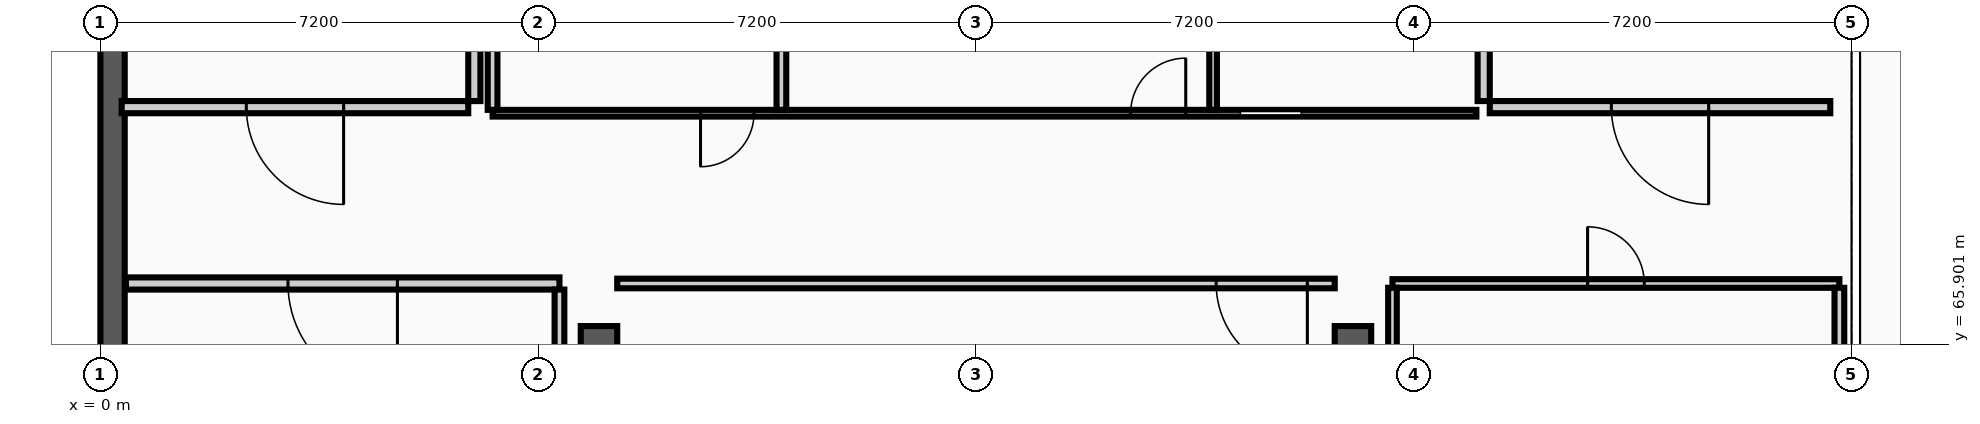
"""IFC4 building model, lengths in metres.
Left out: names, types, materials, properties, quantities, classifications, styles, units other than length and angle.
Written with IfcOpenShell. Run it as: python <this file> out.ifc"""

import sys

from ifc_helpers import new_model, si_unit, direction, frame, frame_2d, origin, place, context, subcontext, project, spatial, rectangle, extrude, element, fill, save


model = new_model("IFC4")
c1 = context("Model", 3, precision=1e-05, world=origin(), true_north=direction((0.0, 1.0)))
c2 = subcontext(c1, "Body", "Model", "MODEL_VIEW")
j1 = project(units=[si_unit("LENGTHUNIT", "METRE"), si_unit("PLANEANGLEUNIT", "RADIAN")], contexts=[c1])
p1 = place(None, origin())
s1 = spatial("IfcSite", under=j1, at=p1, CompositionType="ELEMENT")
p2 = place(p1, origin())
s2 = spatial("IfcBuilding", under=s1, at=p2, CompositionType="ELEMENT")
p3 = place(p2, frame((0.0, 0.0, -4.8)))
s3 = spatial("IfcBuildingStorey", under=s2, at=p3, CompositionType="ELEMENT", Elevation=-4.8)
p4 = place(p3, frame((0.2, 81.6, 0.0), z_axis=(0.0, 0.0, 1.0), x_axis=(0.0, -1.0, 0.0)))
e1 = element("IfcWall", 1, at=p4, inside=s3, PredefinedType="USERDEFINED", context=c2, shape_type="SweptSolid", body=[
    extrude(rectangle(XDim=81.2, YDim=0.4, at=frame_2d((40.6, 0.0))), origin(), (0.0, 0.0, 1.0), 4.545),
])
for number, where, z_axis, x_axis in (
    (2, (8.2, 58.6, 0.0), (0.0, 0.0, 1.0), (0.0, 1.0, 0.0)),
    (3, (20.6, 58.6, 0.0), (0.0, 0.0, 1.0), (0.0, 1.0, 0.0)),
):
    element("IfcWall", number, at=place(p3, frame(where, z_axis=z_axis, x_axis=x_axis)), inside=s3, PredefinedType="SHEAR", context=c2, shape_type="SweptSolid", body=[
        extrude(rectangle(XDim=7.6, YDim=0.6, at=frame_2d((3.8, 0.0))), origin(), (0.0, 0.0, 1.0), 4.5),
    ])
p5 = place(p3, frame((0.35, 69.8, 0.0), z_axis=(0.0, 0.0, 1.0), x_axis=(1.0, 0.0, 0.0)))
e4 = element("IfcWall", 4, at=p5, inside=s3, PredefinedType="PARTITIONING", context=c2, shape_type="SweptSolid", body=[
    extrude(rectangle(XDim=5.7, YDim=0.2, at=frame_2d((2.85, 0.0))), origin(), (0.0, 0.0, 1.0), 4.545),
])
p6 = place(p5, frame((2.05, 0.0, 0.0)))
e5 = element("IfcOpeningElement", 5, at=p6, cuts=e4, PredefinedType="OPENING", context=c2, shape_type="SweptSolid", body=[
    extrude(rectangle(XDim=1.6, YDim=2.2, at=frame_2d((0.8, 1.1))), frame((0.0, 0.11, 0.0), z_axis=(0.0, -1.0, 0.0), x_axis=(1.0, 0.0, 0.0)), (0.0, 0.0, 1.0), 0.22),
])
p7 = place(p3, frame((6.15, 69.9, 0.0), z_axis=(0.0, 0.0, 1.0), x_axis=(0.0, 1.0, 0.0)))
e6 = element("IfcWall", 6, at=p7, inside=s3, PredefinedType="PARTITIONING", context=c2, shape_type="SweptSolid", body=[
    extrude(rectangle(XDim=3.2, YDim=0.2, at=frame_2d((1.6, 0.0))), origin(), (0.0, 0.0, 1.0), 4.545),
])
p8 = place(p3, frame((22.85, 69.8, 0.0), z_axis=(0.0, 0.0, 1.0), x_axis=(1.0, 0.0, 0.0)))
e7 = element("IfcWall", 7, at=p8, inside=s3, PredefinedType="PARTITIONING", context=c2, shape_type="SweptSolid", body=[
    extrude(rectangle(XDim=5.6, YDim=0.2, at=frame_2d((2.8, 0.0))), origin(), (0.0, 0.0, 1.0), 4.545),
])
p9 = place(p8, frame((2.0, 0.0, 0.0)))
e8 = element("IfcOpeningElement", 8, at=p9, cuts=e7, PredefinedType="OPENING", context=c2, shape_type="SweptSolid", body=[
    extrude(rectangle(XDim=1.6, YDim=2.2, at=frame_2d((0.8, 1.1))), frame((0.0, 0.11, 0.0), z_axis=(0.0, -1.0, 0.0), x_axis=(1.0, 0.0, 0.0)), (0.0, 0.0, 1.0), 0.22),
])
p10 = place(p3, frame((22.75, 69.9, 0.0), z_axis=(0.0, 0.0, 1.0), x_axis=(0.0, 1.0, 0.0)))
e9 = element("IfcWall", 9, at=p10, inside=s3, PredefinedType="PARTITIONING", context=c2, shape_type="SweptSolid", body=[
    extrude(rectangle(XDim=3.2, YDim=0.2, at=frame_2d((1.6, 0.0))), origin(), (0.0, 0.0, 1.0), 4.545),
])
p11 = place(p3, frame((0.42, 66.9, 0.0), z_axis=(0.0, 0.0, 1.0), x_axis=(1.0, 0.0, 0.0)))
e10 = element("IfcWall", 10, at=p11, inside=s3, PredefinedType="PARTITIONING", context=c2, shape_type="SweptSolid", body=[
    extrude(rectangle(XDim=7.13, YDim=0.2, at=frame_2d((3.565, 0.0))), origin(), (0.0, 0.0, 1.0), 4.545),
])
p12 = place(p11, frame((2.665, 0.0, 0.0)))
e11 = element("IfcOpeningElement", 11, at=p12, cuts=e10, PredefinedType="OPENING", context=c2, shape_type="SweptSolid", body=[
    extrude(rectangle(XDim=1.8, YDim=2.3, at=frame_2d((0.9, 1.15))), frame((0.0, 0.11, 0.0), z_axis=(0.0, -1.0, 0.0), x_axis=(1.0, 0.0, 0.0)), (0.0, 0.0, 1.0), 0.22),
])
p13 = place(p3, frame((8.5, 66.9, 0.0), z_axis=(0.0, 0.0, 1.0), x_axis=(1.0, 0.0, 0.0)))
e12 = element("IfcWall", 12, at=p13, inside=s3, PredefinedType="PARTITIONING", context=c2, shape_type="SweptSolid", body=[
    extrude(rectangle(XDim=11.8, YDim=0.158, at=frame_2d((5.9, 0.0))), origin(), (0.0, 0.0, 1.0), 4.545),
])
p14 = place(p13, frame((9.85, 0.0, 0.0)))
e13 = element("IfcOpeningElement", 13, at=p14, cuts=e12, PredefinedType="OPENING", context=c2, shape_type="SweptSolid", body=[
    extrude(rectangle(XDim=1.5, YDim=2.2, at=frame_2d((0.75, 1.1))), frame((0.0, 0.089, 0.0), z_axis=(0.0, -1.0, 0.0), x_axis=(1.0, 0.0, 0.0)), (0.0, 0.0, 1.0), 0.178),
])
p15 = place(p3, frame((21.25, 66.9, 0.0), z_axis=(0.0, 0.0, 1.0), x_axis=(1.0, 0.0, 0.0)))
e14 = element("IfcWall", 14, at=p15, inside=s3, PredefinedType="PARTITIONING", context=c2, shape_type="SweptSolid", body=[
    extrude(rectangle(XDim=7.35, YDim=0.142, at=frame_2d((3.675, 0.0))), origin(), (0.0, 0.0, 1.0), 4.545),
])
p16 = place(p15, frame((3.209, 0.0, 0.0)))
e15 = element("IfcOpeningElement", 15, at=p16, cuts=e14, PredefinedType="OPENING", context=c2, shape_type="SweptSolid", body=[
    extrude(rectangle(XDim=0.932, YDim=2.068, at=frame_2d((0.466, 1.034))), frame((0.0, 0.081, 0.0), z_axis=(0.0, -1.0, 0.0), x_axis=(1.0, 0.0, 0.0)), (0.0, 0.0, 1.0), 0.162),
])
p17 = place(p3, frame((6.45, 69.7, 0.0), z_axis=(0.0, 0.0, 1.0), x_axis=(1.0, 0.0, 0.0)))
e16 = element("IfcWall", 16, at=p17, inside=s3, PredefinedType="PARTITIONING", context=c2, shape_type="SweptSolid", body=[
    extrude(rectangle(XDim=16.18, YDim=0.11, at=frame_2d((8.09, 0.0))), origin(), (0.0, 0.0, 1.0), 4.545),
])
p18 = place(p17, frame((12.3, 0.0, 0.0)))
e17 = element("IfcOpeningElement", 17, at=p18, cuts=e16, PredefinedType="OPENING", context=c2, shape_type="SweptSolid", body=[
    extrude(rectangle(XDim=1.0, YDim=2.1, at=frame_2d((0.5, 1.05))), frame((0.0, 0.065, 0.0), z_axis=(0.0, -1.0, 0.0), x_axis=(1.0, 0.0, 0.0)), (0.0, 0.0, 1.0), 0.13),
])
p19 = place(p17, frame((3.42, 0.0, 0.0)))
e18 = element("IfcOpeningElement", 18, at=p19, cuts=e16, PredefinedType="OPENING", context=c2, shape_type="SweptSolid", body=[
    extrude(rectangle(XDim=0.88, YDim=2.068, at=frame_2d((0.44, 1.034))), frame((0.0, 0.065, 0.0), z_axis=(0.0, -1.0, 0.0), x_axis=(1.0, 0.0, 0.0)), (0.0, 0.0, 1.0), 0.13),
])
p20 = place(p17, frame((10.494, 0.0, 0.0)))
e19 = element("IfcOpeningElement", 19, at=p20, cuts=e16, PredefinedType="OPENING", context=c2, shape_type="SweptSolid", body=[
    extrude(rectangle(XDim=0.906, YDim=2.068, at=frame_2d((0.453, 1.034))), frame((0.0, 0.065, 0.0), z_axis=(0.0, -1.0, 0.0), x_axis=(1.0, 0.0, 0.0)), (0.0, 0.0, 1.0), 0.13),
])
p21 = place(p3, frame((6.45, 69.755, 0.0), z_axis=(0.0, 0.0, 1.0), x_axis=(0.0, 1.0, 0.0)))
e20 = element("IfcWall", 20, at=p21, inside=s3, PredefinedType="PARTITIONING", context=c2, shape_type="SweptSolid", body=[
    extrude(rectangle(XDim=3.17, YDim=0.16, at=frame_2d((1.585, 0.0))), origin(), (0.0, 0.0, 1.0), 4.545),
])
p22 = place(p3, frame((7.55, 65.18, 0.0), z_axis=(0.0, 0.0, 1.0), x_axis=(0.0, 1.0, 0.0)))
e21 = element("IfcWall", 21, at=p22, inside=s3, PredefinedType="PARTITIONING", context=c2, shape_type="SweptSolid", body=[
    extrude(rectangle(XDim=1.62, YDim=0.16, at=frame_2d((0.81, 0.0))), origin(), (0.0, 0.0, 1.0), 4.545),
])
p23 = place(p3, frame((11.2, 69.755, 0.0), z_axis=(0.0, 0.0, 1.0), x_axis=(0.0, 1.0, 0.0)))
e22 = element("IfcWall", 22, at=p23, inside=s3, PredefinedType="PARTITIONING", context=c2, shape_type="SweptSolid", body=[
    extrude(rectangle(XDim=11.845, YDim=0.16, at=frame_2d((5.923, 0.0))), origin(), (0.0, 0.0, 1.0), 4.545),
])
p24 = place(p3, frame((18.3, 69.755, 0.0), z_axis=(0.0, 0.0, 1.0), x_axis=(0.0, 1.0, 0.0)))
e23 = element("IfcWall", 23, at=p24, inside=s3, PredefinedType="PARTITIONING", context=c2, shape_type="SweptSolid", body=[
    extrude(rectangle(XDim=11.845, YDim=0.125, at=frame_2d((5.923, 0.0))), origin(), (0.0, 0.0, 1.0), 4.545),
])
p25 = place(p3, frame((21.25, 65.18, 0.0), z_axis=(0.0, 0.0, 1.0), x_axis=(0.0, 1.0, 0.0)))
e24 = element("IfcWall", 24, at=p25, inside=s3, PredefinedType="PARTITIONING", context=c2, shape_type="SweptSolid", body=[
    extrude(rectangle(XDim=1.649, YDim=0.142, at=frame_2d((0.825, 0.0))), origin(), (0.0, 0.0, 1.0), 4.545),
])
p26 = place(p3, frame((28.6, 65.18, 0.0), z_axis=(0.0, 0.0, 1.0), x_axis=(0.0, 1.0, 0.0)))
e25 = element("IfcWall", 25, at=p26, inside=s3, PredefinedType="PARTITIONING", context=c2, shape_type="SweptSolid", body=[
    extrude(rectangle(XDim=1.649, YDim=0.16, at=frame_2d((0.825, 0.0))), origin(), (0.0, 0.0, 1.0), 4.235),
])
p27 = place(p6, origin())
e26 = element("IfcDoor", 26, at=p27, inside=s3, OperationType="DOUBLE_DOOR_SINGLE_SWING", PredefinedType="DOOR", context=c2, shape_type="SweptSolid", body=[
    extrude(rectangle(XDim=1.6, YDim=2.2, at=frame_2d((0.8, 1.1))), frame((0.0, 0.025, 0.0), z_axis=(0.0, -1.0, 0.0), x_axis=(1.0, 0.0, 0.0)), (0.0, 0.0, 1.0), 0.05),
])
fill(e5, e26)
p28 = place(p9, origin())
e27 = element("IfcDoor", 27, at=p28, inside=s3, OperationType="DOUBLE_DOOR_SINGLE_SWING", PredefinedType="DOOR", context=c2, shape_type="SweptSolid", body=[
    extrude(rectangle(XDim=1.6, YDim=2.2, at=frame_2d((0.8, 1.1))), frame((0.0, 0.025, 0.0), z_axis=(0.0, -1.0, 0.0), x_axis=(1.0, 0.0, 0.0)), (0.0, 0.0, 1.0), 0.05),
])
fill(e8, e27)
p29 = place(p14, origin())
e28 = element("IfcDoor", 28, at=p29, inside=s3, OperationType="DOUBLE_DOOR_SINGLE_SWING", PredefinedType="DOOR", context=c2, shape_type="SweptSolid", body=[
    extrude(rectangle(XDim=1.5, YDim=2.2, at=frame_2d((0.75, 1.1))), frame((0.0, 0.025, 0.0), z_axis=(0.0, -1.0, 0.0), x_axis=(1.0, 0.0, 0.0)), (0.0, 0.0, 1.0), 0.05),
])
fill(e13, e28)
p30 = place(p18, frame((1.0, 0.0, 0.0), z_axis=(0.0, 0.0, 1.0), x_axis=(-1.0, 0.0, 0.0)))
e29 = element("IfcDoor", 29, at=p30, inside=s3, OperationType="SLIDING_TO_LEFT", PredefinedType="DOOR", context=c2, shape_type="SweptSolid", body=[
    extrude(rectangle(XDim=1.0, YDim=2.1, at=frame_2d((0.5, 1.05))), frame((0.0, 0.025, 0.0), z_axis=(0.0, -1.0, 0.0), x_axis=(1.0, 0.0, 0.0)), (0.0, 0.0, 1.0), 0.05),
])
fill(e17, e29)
p31 = place(p19, frame((0.88, 0.0, 0.0), z_axis=(0.0, 0.0, 1.0), x_axis=(-1.0, 0.0, 0.0)))
e30 = element("IfcDoor", 30, at=p31, inside=s3, OperationType="SINGLE_SWING_LEFT", PredefinedType="DOOR", context=c2, shape_type="SweptSolid", body=[
    extrude(rectangle(XDim=0.88, YDim=2.068, at=frame_2d((0.44, 1.034))), frame((0.0, 0.025, 0.0), z_axis=(0.0, -1.0, 0.0), x_axis=(1.0, 0.0, 0.0)), (0.0, 0.0, 1.0), 0.05),
])
fill(e18, e30)
p32 = place(p20, frame((0.906, 0.0, 0.0), z_axis=(0.0, 0.0, 1.0), x_axis=(-1.0, 0.0, 0.0)))
e31 = element("IfcDoor", 31, at=p32, inside=s3, OperationType="SINGLE_SWING_RIGHT", PredefinedType="DOOR", context=c2, shape_type="SweptSolid", body=[
    extrude(rectangle(XDim=0.906, YDim=2.068, at=frame_2d((0.453, 1.034))), frame((0.0, 0.025, 0.0), z_axis=(0.0, -1.0, 0.0), x_axis=(1.0, 0.0, 0.0)), (0.0, 0.0, 1.0), 0.05),
])
fill(e19, e31)
p33 = place(p12, origin())
e32 = element("IfcDoor", 32, at=p33, inside=s3, OperationType="DOUBLE_DOOR_SINGLE_SWING", PredefinedType="DOOR", context=c2, shape_type="SweptSolid", body=[
    extrude(rectangle(XDim=1.8, YDim=2.3, at=frame_2d((0.9, 1.15))), frame((0.0, 0.025, 0.0), z_axis=(0.0, -1.0, 0.0), x_axis=(1.0, 0.0, 0.0)), (0.0, 0.0, 1.0), 0.05),
])
fill(e11, e32)
p34 = place(p16, origin())
e33 = element("IfcDoor", 33, at=p34, inside=s3, OperationType="SINGLE_SWING_LEFT", PredefinedType="DOOR", context=c2, shape_type="SweptSolid", body=[
    extrude(rectangle(XDim=0.932, YDim=2.068, at=frame_2d((0.466, 1.034))), frame((0.0, 0.025, 0.0), z_axis=(0.0, -1.0, 0.0), x_axis=(1.0, 0.0, 0.0)), (0.0, 0.0, 1.0), 0.05),
])
fill(e15, e33)
save(model, sys.argv[1])
